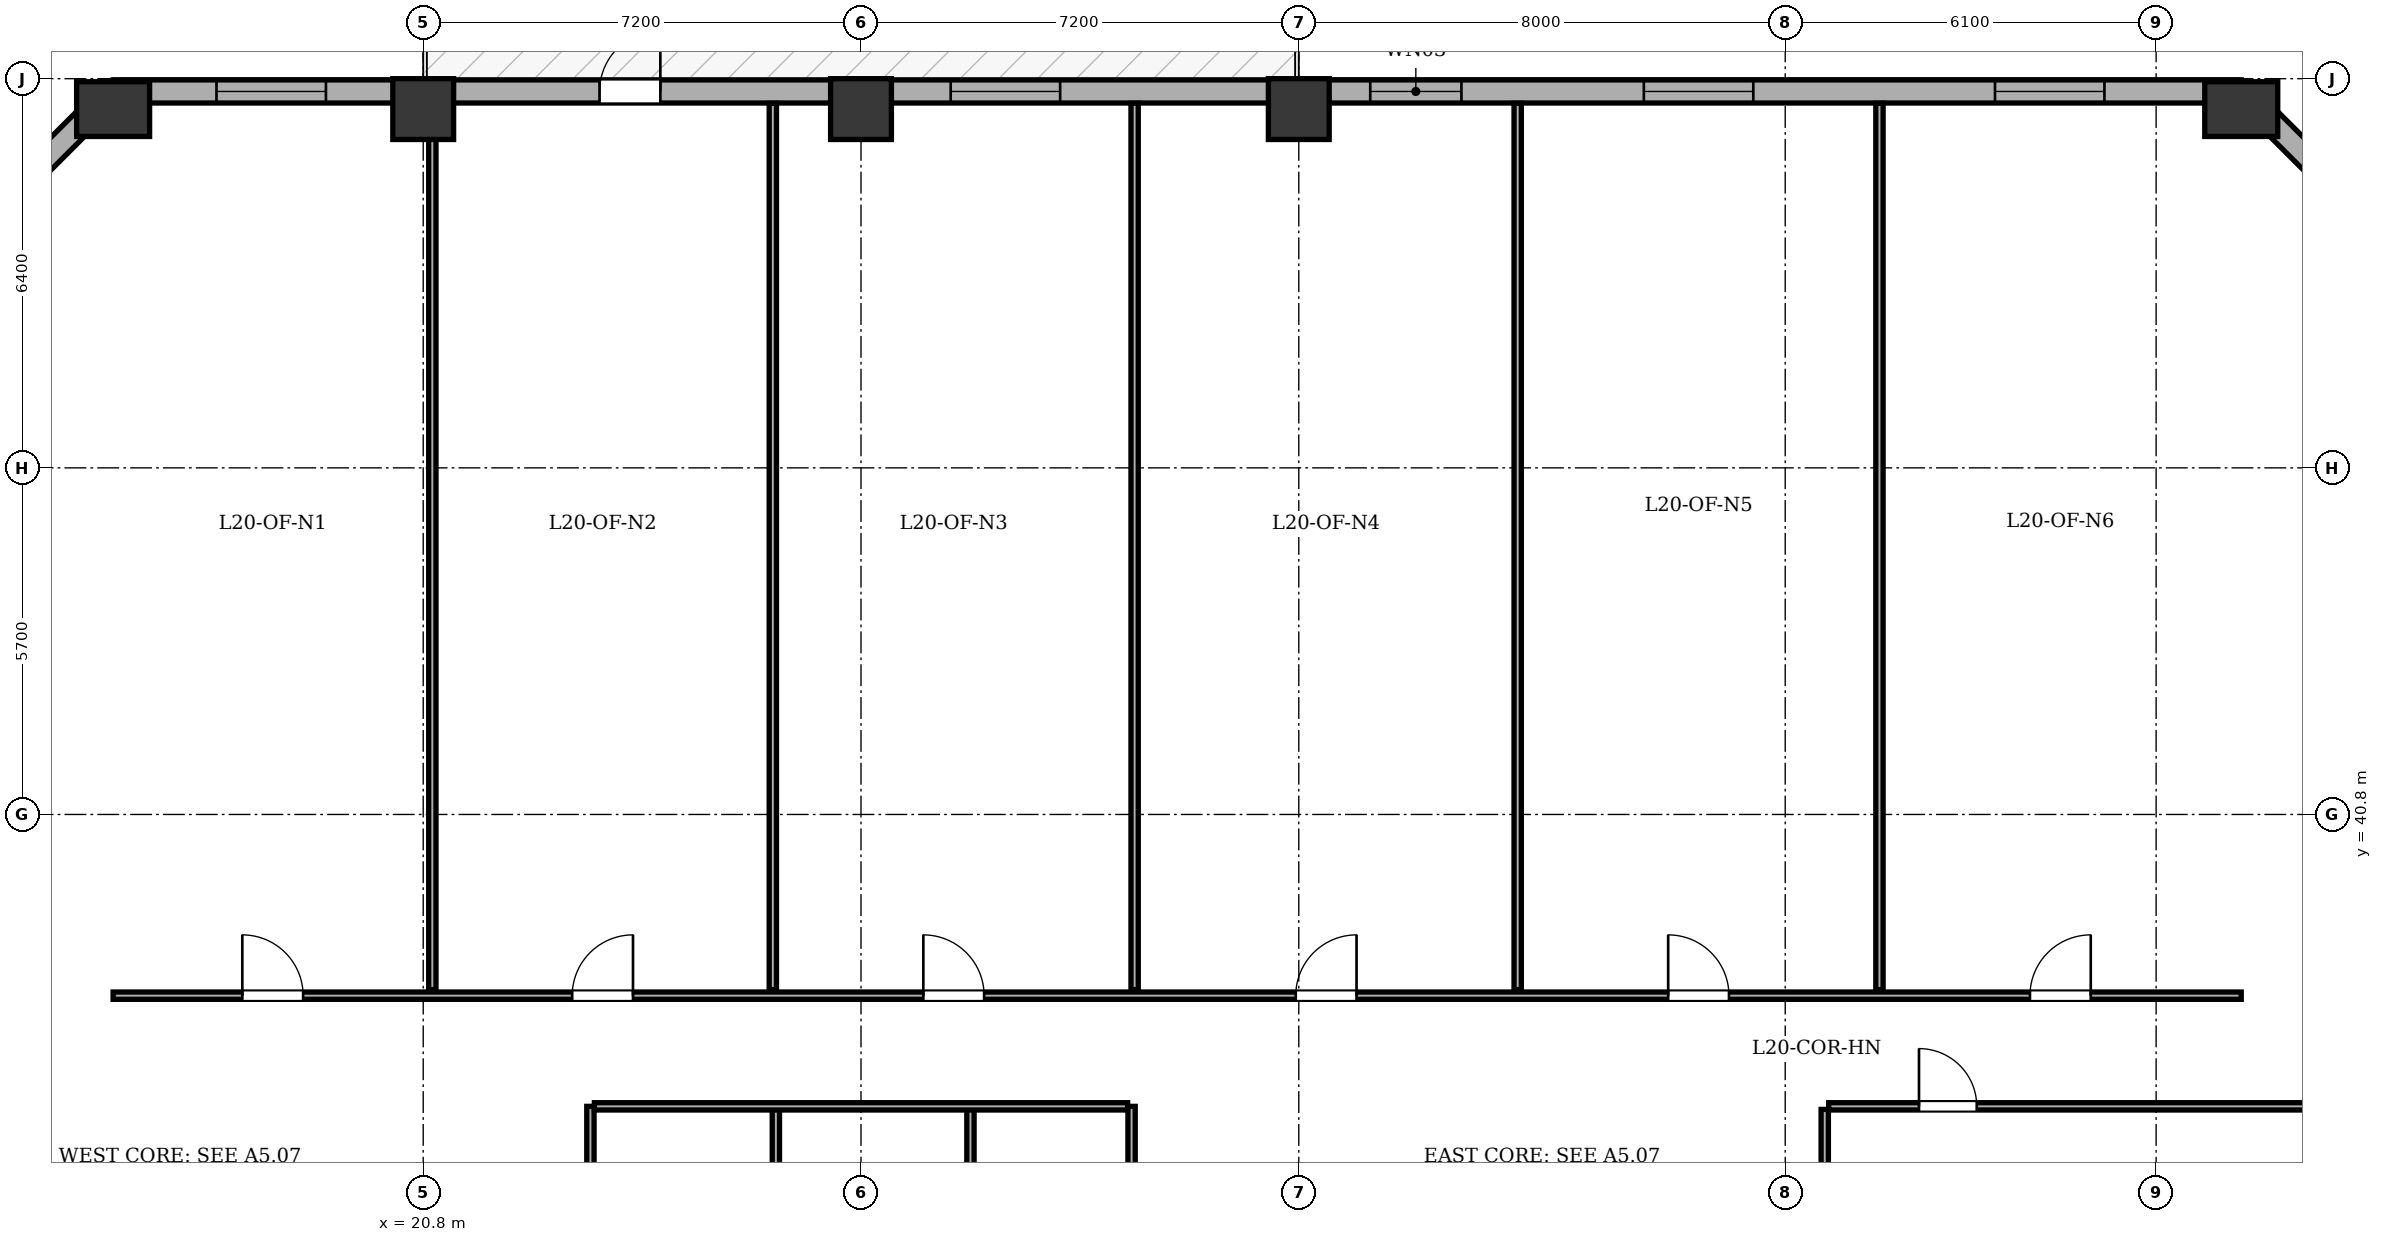
"""IFC4 building model, lengths in metres.
Left out: names, types, materials, properties, quantities, classifications, styles, units other than length and angle.
Written with IfcOpenShell. Run it as: python <this file> out.ifc"""

import sys

from ifc_helpers import new_model, si_unit, direction, frame, frame_2d, origin, origin_2d, place, context, subcontext, project, spatial, rectangle, extrude, element, fill, save


model = new_model("IFC4")
c1 = context("Model", 3, precision=1e-05, world=origin(), true_north=direction((0.0, 1.0)))
c2 = subcontext(c1, "Body", "Model", "MODEL_VIEW")
j1 = project(units=[si_unit("LENGTHUNIT", "METRE"), si_unit("PLANEANGLEUNIT", "RADIAN")], contexts=[c1])
p1 = place(None, origin())
s1 = spatial("IfcSite", under=j1, at=p1, CompositionType="ELEMENT")
p2 = place(p1, origin())
s2 = spatial("IfcBuilding", under=s1, at=p2, CompositionType="ELEMENT")
p3 = place(p2, frame((0.0, 0.0, 82.8)))
s3 = spatial("IfcBuildingStorey", under=s2, at=p3, CompositionType="ELEMENT", Elevation=82.8)
p4 = place(p3, frame((15.7, 52.4, 0.0), z_axis=(0.0, 0.0, 1.0), x_axis=(1.0, 0.0, 0.0)))
e1 = element("IfcColumn", 1, at=p4, inside=s3, PredefinedType="COLUMN", context=c2, shape_type="SweptSolid", body=[
    extrude(rectangle(XDim=0.9, YDim=1.2, at=origin_2d()), origin(), (0.0, 0.0, 1.0), 3.9),
])
for number, where, z_axis, x_axis in (
    (2, (20.8, 52.4, 0.0), (0.0, 0.0, 1.0), (1.0, 0.0, 0.0)),
    (3, (28.0, 52.4, 0.0), (0.0, 0.0, 1.0), (1.0, 0.0, 0.0)),
    (4, (35.2, 52.4, 0.0), (0.0, 0.0, 1.0), (1.0, 0.0, 0.0)),
):
    element("IfcColumn", number, at=place(p3, frame(where, z_axis=z_axis, x_axis=x_axis)), inside=s3, PredefinedType="COLUMN", context=c2, shape_type="SweptSolid", body=[
        extrude(rectangle(XDim=1.0, YDim=1.0, at=origin_2d()), origin(), (0.0, 0.0, 1.0), 3.9),
    ])
p5 = place(p3, frame((50.7, 52.4, 0.0), z_axis=(0.0, 0.0, 1.0), x_axis=(1.0, 0.0, 0.0)))
e5 = element("IfcColumn", 5, at=p5, inside=s3, PredefinedType="COLUMN", context=c2, shape_type="SweptSolid", body=[
    extrude(rectangle(XDim=0.9, YDim=1.2, at=origin_2d()), origin(), (0.0, 0.0, 1.0), 3.9),
])
p6 = place(p3, frame((10.91, 47.9, 0.0), z_axis=(0.0, 0.0, 1.0), x_axis=(0.707106781187, 0.707106781187, 0.0)))
e6 = element("IfcWall", 6, at=p6, inside=s3, PredefinedType="STANDARD", context=c2, shape_type="SweptSolid", body=[
    extrude(rectangle(XDim=6.774, YDim=0.38, at=frame_2d((3.387, 0.0))), origin(), (0.0, 0.0, 1.0), 3.135),
])
p7 = place(p6, frame((2.687, 0.0, 0.8)))
e7 = element("IfcOpeningElement", 7, at=p7, cuts=e6, PredefinedType="OPENING", context=c2, shape_type="SweptSolid", body=[
    extrude(rectangle(XDim=1.4, YDim=1.65, at=frame_2d((0.7, 0.825))), frame((0.0, 0.2, 0.0), z_axis=(0.0, -1.0, 0.0), x_axis=(1.0, 0.0, 0.0)), (0.0, 0.0, 1.0), 0.4),
])
p8 = place(p3, frame((15.7, 52.69, 0.0), z_axis=(0.0, 0.0, 1.0), x_axis=(1.0, 0.0, 0.0)))
e8 = element("IfcWall", 8, at=p8, inside=s3, PredefinedType="STANDARD", context=c2, shape_type="SweptSolid", body=[
    extrude(rectangle(XDim=35.0, YDim=0.38, at=frame_2d((17.5, 0.0))), origin(), (0.0, 0.0, 1.0), 3.135),
])
p9 = place(p8, frame((8.0, 0.0, 0.0)))
e9 = element("IfcOpeningElement", 9, at=p9, cuts=e8, PredefinedType="OPENING", context=c2, shape_type="SweptSolid", body=[
    extrude(rectangle(XDim=1.0, YDim=2.02, at=frame_2d((0.5, 1.01))), frame((0.0, 0.2, 0.0), z_axis=(0.0, -1.0, 0.0), x_axis=(1.0, 0.0, 0.0)), (0.0, 0.0, 1.0), 0.4),
])
p10 = place(p8, frame((1.7, 0.0, 0.8)))
e10 = element("IfcOpeningElement", 10, at=p10, cuts=e8, PredefinedType="OPENING", context=c2, shape_type="SweptSolid", body=[
    extrude(rectangle(XDim=1.8, YDim=1.9, at=frame_2d((0.9, 0.95))), frame((0.0, 0.2, 0.0), z_axis=(0.0, -1.0, 0.0), x_axis=(1.0, 0.0, 0.0)), (0.0, 0.0, 1.0), 0.4),
])
p11 = place(p8, frame((13.775, 0.0, 0.8)))
e11 = element("IfcOpeningElement", 11, at=p11, cuts=e8, PredefinedType="OPENING", context=c2, shape_type="SweptSolid", body=[
    extrude(rectangle(XDim=1.8, YDim=1.9, at=frame_2d((0.9, 0.95))), frame((0.0, 0.2, 0.0), z_axis=(0.0, -1.0, 0.0), x_axis=(1.0, 0.0, 0.0)), (0.0, 0.0, 1.0), 0.4),
])
p12 = place(p8, frame((20.675, 0.0, 0.8)))
e12 = element("IfcOpeningElement", 12, at=p12, cuts=e8, PredefinedType="OPENING", context=c2, shape_type="SweptSolid", body=[
    extrude(rectangle(XDim=1.5, YDim=1.9, at=frame_2d((0.75, 0.95))), frame((0.0, 0.2, 0.0), z_axis=(0.0, -1.0, 0.0), x_axis=(1.0, 0.0, 0.0)), (0.0, 0.0, 1.0), 0.4),
])
p13 = place(p8, frame((25.175, 0.0, 0.8)))
e13 = element("IfcOpeningElement", 13, at=p13, cuts=e8, PredefinedType="OPENING", context=c2, shape_type="SweptSolid", body=[
    extrude(rectangle(XDim=1.8, YDim=1.9, at=frame_2d((0.9, 0.95))), frame((0.0, 0.2, 0.0), z_axis=(0.0, -1.0, 0.0), x_axis=(1.0, 0.0, 0.0)), (0.0, 0.0, 1.0), 0.4),
])
p14 = place(p8, frame((30.95, 0.0, 0.8)))
e14 = element("IfcOpeningElement", 14, at=p14, cuts=e8, PredefinedType="OPENING", context=c2, shape_type="SweptSolid", body=[
    extrude(rectangle(XDim=1.8, YDim=1.9, at=frame_2d((0.9, 0.95))), frame((0.0, 0.2, 0.0), z_axis=(0.0, -1.0, 0.0), x_axis=(1.0, 0.0, 0.0)), (0.0, 0.0, 1.0), 0.4),
])
p15 = place(p3, frame((50.7, 52.69, 0.0), z_axis=(0.0, 0.0, 1.0), x_axis=(0.707106781187, -0.707106781187, 0.0)))
e15 = element("IfcWall", 15, at=p15, inside=s3, PredefinedType="STANDARD", context=c2, shape_type="SweptSolid", body=[
    extrude(rectangle(XDim=6.774, YDim=0.38, at=frame_2d((3.387, 0.0))), origin(), (0.0, 0.0, 1.0), 3.135),
])
p16 = place(p15, frame((2.687, 0.0, 0.8)))
e16 = element("IfcOpeningElement", 16, at=p16, cuts=e15, PredefinedType="OPENING", context=c2, shape_type="SweptSolid", body=[
    extrude(rectangle(XDim=1.4, YDim=1.65, at=frame_2d((0.7, 0.825))), frame((0.0, 0.2, 0.0), z_axis=(0.0, -1.0, 0.0), x_axis=(1.0, 0.0, 0.0)), (0.0, 0.0, 1.0), 0.4),
])
for number, where, z_axis, x_axis in (
    (17, (23.55, 24.715, 0.0), (0.0, 0.0, 1.0), (0.0, 1.0, 0.0)),
    (18, (32.45, 24.715, 0.0), (0.0, 0.0, 1.0), (0.0, 1.0, 0.0)),
    (19, (26.6, 24.715, 0.0), (0.0, 0.0, 1.0), (0.0, 1.0, 0.0)),
):
    element("IfcWall", number, at=place(p3, frame(where, z_axis=z_axis, x_axis=x_axis)), inside=s3, PredefinedType="PARTITIONING", context=c2, shape_type="SweptSolid", body=[
        extrude(rectangle(XDim=11.285, YDim=0.12, at=frame_2d((5.643, 0.0))), origin(), (0.0, 0.0, 1.0), 3.6),
    ])
p17 = place(p3, frame((29.8, 24.715, 0.0), z_axis=(0.0, 0.0, 1.0), x_axis=(0.0, 1.0, 0.0)))
e20 = element("IfcWall", 20, at=p17, inside=s3, PredefinedType="PARTITIONING", context=c2, shape_type="SweptSolid", body=[
    extrude(rectangle(XDim=11.285, YDim=0.12, at=frame_2d((5.643, 0.0))), origin(), (0.0, 0.0, 1.0), 3.135),
])
p18 = place(p3, frame((23.615, 36.0, 0.0), z_axis=(0.0, 0.0, 1.0), x_axis=(1.0, 0.0, 0.0)))
e21 = element("IfcWall", 21, at=p18, inside=s3, PredefinedType="PARTITIONING", context=c2, shape_type="SweptSolid", body=[
    extrude(rectangle(XDim=8.77, YDim=0.12, at=frame_2d((4.385, 0.0))), origin(), (0.0, 0.0, 1.0), 3.6),
])
p19 = place(p3, frame((15.7, 37.82, 0.0), z_axis=(0.0, 0.0, 1.0), x_axis=(1.0, 0.0, 0.0)))
e22 = element("IfcWall", 22, at=p19, inside=s3, PredefinedType="PARTITIONING", context=c2, shape_type="SweptSolid", body=[
    extrude(rectangle(XDim=35.0, YDim=0.12, at=frame_2d((17.5, 0.0))), origin(), (0.0, 0.0, 1.0), 3.6),
])
p20 = place(p19, frame((2.125, 0.0, 0.0)))
e23 = element("IfcOpeningElement", 23, at=p20, cuts=e22, PredefinedType="OPENING", context=c2, shape_type="SweptSolid", body=[
    extrude(rectangle(XDim=1.0, YDim=2.1, at=frame_2d((0.5, 1.05))), frame((0.0, 0.07, 0.0), z_axis=(0.0, -1.0, 0.0), x_axis=(1.0, 0.0, 0.0)), (0.0, 0.0, 1.0), 0.14),
])
p21 = place(p19, frame((7.55, 0.0, 0.0)))
e24 = element("IfcOpeningElement", 24, at=p21, cuts=e22, PredefinedType="OPENING", context=c2, shape_type="SweptSolid", body=[
    extrude(rectangle(XDim=1.0, YDim=2.1, at=frame_2d((0.5, 1.05))), frame((0.0, 0.07, 0.0), z_axis=(0.0, -1.0, 0.0), x_axis=(1.0, 0.0, 0.0)), (0.0, 0.0, 1.0), 0.14),
])
p22 = place(p19, frame((13.325, 0.0, 0.0)))
e25 = element("IfcOpeningElement", 25, at=p22, cuts=e22, PredefinedType="OPENING", context=c2, shape_type="SweptSolid", body=[
    extrude(rectangle(XDim=1.0, YDim=2.1, at=frame_2d((0.5, 1.05))), frame((0.0, 0.07, 0.0), z_axis=(0.0, -1.0, 0.0), x_axis=(1.0, 0.0, 0.0)), (0.0, 0.0, 1.0), 0.14),
])
p23 = place(p19, frame((19.45, 0.0, 0.0)))
e26 = element("IfcOpeningElement", 26, at=p23, cuts=e22, PredefinedType="OPENING", context=c2, shape_type="SweptSolid", body=[
    extrude(rectangle(XDim=1.0, YDim=2.1, at=frame_2d((0.5, 1.05))), frame((0.0, 0.07, 0.0), z_axis=(0.0, -1.0, 0.0), x_axis=(1.0, 0.0, 0.0)), (0.0, 0.0, 1.0), 0.14),
])
p24 = place(p19, frame((25.575, 0.0, 0.0)))
e27 = element("IfcOpeningElement", 27, at=p24, cuts=e22, PredefinedType="OPENING", context=c2, shape_type="SweptSolid", body=[
    extrude(rectangle(XDim=1.0, YDim=2.1, at=frame_2d((0.5, 1.05))), frame((0.0, 0.07, 0.0), z_axis=(0.0, -1.0, 0.0), x_axis=(1.0, 0.0, 0.0)), (0.0, 0.0, 1.0), 0.14),
])
p25 = place(p19, frame((31.525, 0.0, 0.0)))
e28 = element("IfcOpeningElement", 28, at=p25, cuts=e22, PredefinedType="OPENING", context=c2, shape_type="SweptSolid", body=[
    extrude(rectangle(XDim=1.0, YDim=2.1, at=frame_2d((0.5, 1.05))), frame((0.0, 0.07, 0.0), z_axis=(0.0, -1.0, 0.0), x_axis=(1.0, 0.0, 0.0)), (0.0, 0.0, 1.0), 0.14),
])
p26 = place(p3, frame((20.95, 37.92, 0.0), z_axis=(0.0, 0.0, 1.0), x_axis=(0.0, 1.0, 0.0)))
e29 = element("IfcWall", 29, at=p26, inside=s3, PredefinedType="PARTITIONING", context=c2, shape_type="SweptSolid", body=[
    extrude(rectangle(XDim=14.575, YDim=0.12, at=frame_2d((7.288, 0.0))), origin(), (0.0, 0.0, 1.0), 2.835),
])
for number, where, z_axis, x_axis in (
    (30, (26.55, 37.92, 0.0), (0.0, 0.0, 1.0), (0.0, 1.0, 0.0)),
    (31, (32.5, 37.92, 0.0), (0.0, 0.0, 1.0), (0.0, 1.0, 0.0)),
    (32, (38.8, 37.92, 0.0), (0.0, 0.0, 1.0), (0.0, 1.0, 0.0)),
    (33, (44.75, 37.92, 0.0), (0.0, 0.0, 1.0), (0.0, 1.0, 0.0)),
):
    element("IfcWall", number, at=place(p3, frame(where, z_axis=z_axis, x_axis=x_axis)), inside=s3, PredefinedType="PARTITIONING", context=c2, shape_type="SweptSolid", body=[
        extrude(rectangle(XDim=14.575, YDim=0.12, at=frame_2d((7.288, 0.0))), origin(), (0.0, 0.0, 1.0), 3.6),
    ])
p27 = place(p3, frame((43.85, 18.45, 0.0), z_axis=(0.0, 0.0, 1.0), x_axis=(0.0, 1.0, 0.0)))
e34 = element("IfcWall", 34, at=p27, inside=s3, PredefinedType="PARTITIONING", context=c2, shape_type="SweptSolid", body=[
    extrude(rectangle(XDim=17.5, YDim=0.12, at=frame_2d((8.75, 0.0))), origin(), (0.0, 0.0, 1.0), 3.6),
])
p28 = place(p3, frame((43.915, 36.0, 0.0), z_axis=(0.0, 0.0, 1.0), x_axis=(1.0, 0.0, 0.0)))
e35 = element("IfcWall", 35, at=p28, inside=s3, PredefinedType="PARTITIONING", context=c2, shape_type="SweptSolid", body=[
    extrude(rectangle(XDim=11.38, YDim=0.12, at=frame_2d((5.69, 0.0))), origin(), (0.0, 0.0, 1.0), 3.6),
])
p29 = place(p28, frame((1.485, 0.0, 0.0)))
e36 = element("IfcOpeningElement", 36, at=p29, cuts=e35, PredefinedType="OPENING", context=c2, shape_type="SweptSolid", body=[
    extrude(rectangle(XDim=0.95, YDim=2.1, at=frame_2d((0.475, 1.05))), frame((0.0, 0.07, 0.0), z_axis=(0.0, -1.0, 0.0), x_axis=(1.0, 0.0, 0.0)), (0.0, 0.0, 1.0), 0.14),
])
p30 = place(p9, origin())
e37 = element("IfcDoor", 37, at=p30, inside=s3, OperationType="SINGLE_SWING_RIGHT", PredefinedType="DOOR", context=c2, shape_type="SweptSolid", body=[
    extrude(rectangle(XDim=1.0, YDim=2.02, at=frame_2d((0.5, 1.01))), frame((0.0, 0.025, 0.0), z_axis=(0.0, -1.0, 0.0), x_axis=(1.0, 0.0, 0.0)), (0.0, 0.0, 1.0), 0.05),
])
fill(e9, e37)
p31 = place(p10, origin())
e38 = element("IfcWindow", 38, at=p31, inside=s3, PartitioningType="SINGLE_PANEL", PredefinedType="WINDOW", context=c2, shape_type="SweptSolid", body=[
    extrude(rectangle(XDim=1.8, YDim=1.9, at=frame_2d((0.9, 0.95))), frame((0.0, -0.01, 0.0), z_axis=(0.0, -1.0, 0.0), x_axis=(1.0, 0.0, 0.0)), (0.0, 0.0, 1.0), 0.06),
])
fill(e10, e38)
p32 = place(p11, origin())
e39 = element("IfcWindow", 39, at=p32, inside=s3, PartitioningType="SINGLE_PANEL", PredefinedType="WINDOW", context=c2, shape_type="SweptSolid", body=[
    extrude(rectangle(XDim=1.8, YDim=1.9, at=frame_2d((0.9, 0.95))), frame((0.0, -0.01, 0.0), z_axis=(0.0, -1.0, 0.0), x_axis=(1.0, 0.0, 0.0)), (0.0, 0.0, 1.0), 0.06),
])
fill(e11, e39)
p33 = place(p12, origin())
e40 = element("IfcWindow", 40, at=p33, inside=s3, PartitioningType="SINGLE_PANEL", PredefinedType="WINDOW", context=c2, shape_type="SweptSolid", body=[
    extrude(rectangle(XDim=1.5, YDim=1.9, at=frame_2d((0.75, 0.95))), frame((0.0, -0.01, 0.0), z_axis=(0.0, -1.0, 0.0), x_axis=(1.0, 0.0, 0.0)), (0.0, 0.0, 1.0), 0.06),
])
fill(e12, e40)
p34 = place(p13, origin())
e41 = element("IfcWindow", 41, at=p34, inside=s3, PartitioningType="SINGLE_PANEL", PredefinedType="WINDOW", context=c2, shape_type="SweptSolid", body=[
    extrude(rectangle(XDim=1.8, YDim=1.9, at=frame_2d((0.9, 0.95))), frame((0.0, -0.01, 0.0), z_axis=(0.0, -1.0, 0.0), x_axis=(1.0, 0.0, 0.0)), (0.0, 0.0, 1.0), 0.06),
])
fill(e13, e41)
p35 = place(p14, origin())
e42 = element("IfcWindow", 42, at=p35, inside=s3, PartitioningType="SINGLE_PANEL", PredefinedType="WINDOW", context=c2, shape_type="SweptSolid", body=[
    extrude(rectangle(XDim=1.8, YDim=1.9, at=frame_2d((0.9, 0.95))), frame((0.0, -0.01, 0.0), z_axis=(0.0, -1.0, 0.0), x_axis=(1.0, 0.0, 0.0)), (0.0, 0.0, 1.0), 0.06),
])
fill(e14, e42)
p36 = place(p20, origin())
e43 = element("IfcDoor", 43, at=p36, inside=s3, OperationType="SINGLE_SWING_LEFT", PredefinedType="DOOR", context=c2, shape_type="SweptSolid", body=[
    extrude(rectangle(XDim=1.0, YDim=2.1, at=frame_2d((0.5, 1.05))), frame((0.0, 0.025, 0.0), z_axis=(0.0, -1.0, 0.0), x_axis=(1.0, 0.0, 0.0)), (0.0, 0.0, 1.0), 0.05),
])
fill(e23, e43)
p37 = place(p21, origin())
e44 = element("IfcDoor", 44, at=p37, inside=s3, OperationType="SINGLE_SWING_RIGHT", PredefinedType="DOOR", context=c2, shape_type="SweptSolid", body=[
    extrude(rectangle(XDim=1.0, YDim=2.1, at=frame_2d((0.5, 1.05))), frame((0.0, 0.025, 0.0), z_axis=(0.0, -1.0, 0.0), x_axis=(1.0, 0.0, 0.0)), (0.0, 0.0, 1.0), 0.05),
])
fill(e24, e44)
p38 = place(p22, origin())
e45 = element("IfcDoor", 45, at=p38, inside=s3, OperationType="SINGLE_SWING_LEFT", PredefinedType="DOOR", context=c2, shape_type="SweptSolid", body=[
    extrude(rectangle(XDim=1.0, YDim=2.1, at=frame_2d((0.5, 1.05))), frame((0.0, 0.025, 0.0), z_axis=(0.0, -1.0, 0.0), x_axis=(1.0, 0.0, 0.0)), (0.0, 0.0, 1.0), 0.05),
])
fill(e25, e45)
p39 = place(p23, origin())
e46 = element("IfcDoor", 46, at=p39, inside=s3, OperationType="SINGLE_SWING_RIGHT", PredefinedType="DOOR", context=c2, shape_type="SweptSolid", body=[
    extrude(rectangle(XDim=1.0, YDim=2.1, at=frame_2d((0.5, 1.05))), frame((0.0, 0.025, 0.0), z_axis=(0.0, -1.0, 0.0), x_axis=(1.0, 0.0, 0.0)), (0.0, 0.0, 1.0), 0.05),
])
fill(e26, e46)
p40 = place(p24, origin())
e47 = element("IfcDoor", 47, at=p40, inside=s3, OperationType="SINGLE_SWING_LEFT", PredefinedType="DOOR", context=c2, shape_type="SweptSolid", body=[
    extrude(rectangle(XDim=1.0, YDim=2.1, at=frame_2d((0.5, 1.05))), frame((0.0, 0.025, 0.0), z_axis=(0.0, -1.0, 0.0), x_axis=(1.0, 0.0, 0.0)), (0.0, 0.0, 1.0), 0.05),
])
fill(e27, e47)
p41 = place(p25, origin())
e48 = element("IfcDoor", 48, at=p41, inside=s3, OperationType="SINGLE_SWING_RIGHT", PredefinedType="DOOR", context=c2, shape_type="SweptSolid", body=[
    extrude(rectangle(XDim=1.0, YDim=2.1, at=frame_2d((0.5, 1.05))), frame((0.0, 0.025, 0.0), z_axis=(0.0, -1.0, 0.0), x_axis=(1.0, 0.0, 0.0)), (0.0, 0.0, 1.0), 0.05),
])
fill(e28, e48)
p42 = place(p29, origin())
e49 = element("IfcDoor", 49, at=p42, inside=s3, OperationType="SINGLE_SWING_LEFT", PredefinedType="DOOR", context=c2, shape_type="SweptSolid", body=[
    extrude(rectangle(XDim=0.95, YDim=2.1, at=frame_2d((0.475, 1.05))), frame((0.0, 0.025, 0.0), z_axis=(0.0, -1.0, 0.0), x_axis=(1.0, 0.0, 0.0)), (0.0, 0.0, 1.0), 0.05),
])
fill(e36, e49)
save(model, sys.argv[1])
